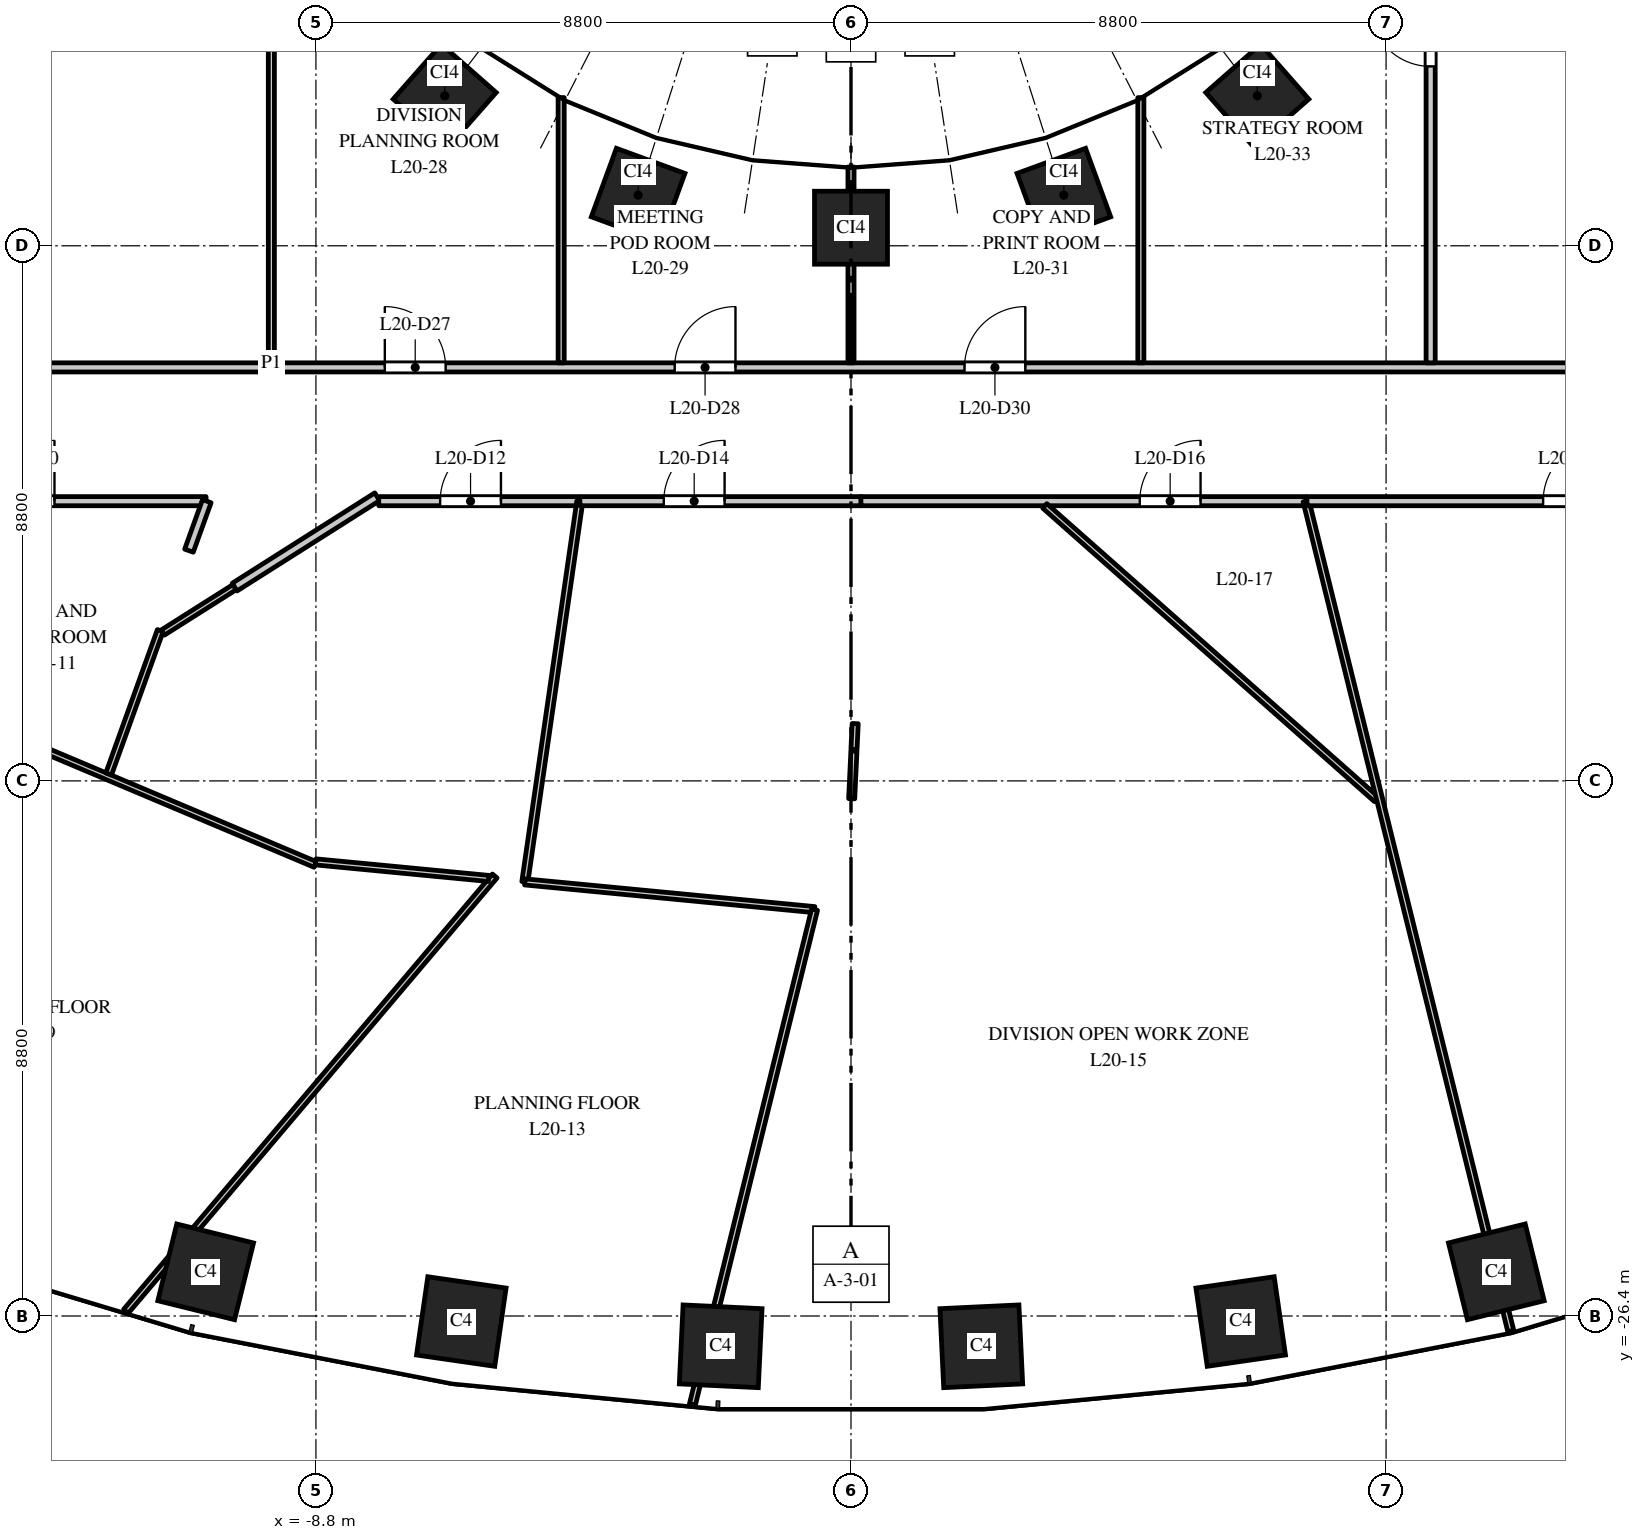
"""IFC4 building model, lengths in metres.
Left out: names, types, materials, properties, quantities, classifications, styles, units other than length and angle.
Written with IfcOpenShell. Run it as: python <this file> out.ifc"""

import sys

from ifc_helpers import new_model, si_unit, direction, frame, frame_2d, origin, origin_2d, place, context, subcontext, project, spatial, rectangle, extrude, element, fill, save


model = new_model("IFC4")
c1 = context("Model", 3, precision=1e-05, world=origin(), true_north=direction((0.0, 1.0)))
c2 = subcontext(c1, "Body", "Model", "MODEL_VIEW")
j1 = project(units=[si_unit("LENGTHUNIT", "METRE"), si_unit("PLANEANGLEUNIT", "RADIAN")], contexts=[c1])
p1 = place(None, origin())
s1 = spatial("IfcSite", under=j1, at=p1, CompositionType="ELEMENT")
p2 = place(p1, origin())
s2 = spatial("IfcBuilding", under=s1, at=p2, CompositionType="ELEMENT")
p3 = place(p2, frame((0.0, 0.0, 92.0)))
s3 = spatial("IfcBuildingStorey", under=s2, at=p3, CompositionType="ELEMENT", Elevation=92.0)
for number, where, z_axis, x_axis in (
    (1, (-10.613, -25.674, 0.0), (0.0, 0.0, 1.0), (0.971, -0.24, 0.0)),
    (2, (-6.409, -26.491, 0.0), (0.0, 0.0, 1.0), (0.99, -0.143, 0.0)),
    (3, (-2.143, -26.898, 0.0), (0.0, 0.0, 1.0), (0.999, -0.048, 0.0)),
    (4, (2.143, -26.898, 0.0), (0.0, 0.0, 1.0), (0.999, 0.048, 0.0)),
    (5, (6.409, -26.491, 0.0), (0.0, 0.0, 1.0), (0.99, 0.143, 0.0)),
    (6, (10.613, -25.674, 0.0), (0.0, 0.0, 1.0), (0.971, 0.24, 0.0)),
):
    element("IfcColumn", number, at=place(p3, frame(where, z_axis=z_axis, x_axis=x_axis)), inside=s3, PredefinedType="COLUMN", context=c2, shape_type="SweptSolid", body=[
        extrude(rectangle(XDim=1.3, YDim=1.3, at=origin_2d()), origin(), (0.0, 0.0, 1.0), 4.0),
    ])
for number, where, z_axis, x_axis in (
    (7, (-6.682, -6.334, 0.0), (0.0, 0.0, 1.0), (0.751, -0.66, 0.0)),
    (8, (-3.501, -7.967, 0.0), (0.0, 0.0, 1.0), (0.939, -0.344, 0.0)),
    (9, (0.0, -8.503, 0.0), (0.0, 0.0, 1.0), (1.0, 0.0, 0.0)),
    (10, (3.501, -7.967, 0.0), (0.0, 0.0, 1.0), (0.939, 0.344, 0.0)),
    (11, (6.682, -6.334, 0.0), (0.0, 0.0, 1.0), (0.751, 0.66, 0.0)),
):
    element("IfcColumn", number, at=place(p3, frame(where, z_axis=z_axis, x_axis=x_axis)), inside=s3, PredefinedType="COLUMN", context=c2, shape_type="SweptSolid", body=[
        extrude(rectangle(XDim=1.2, YDim=1.2, at=origin_2d()), origin(), (0.0, 0.0, 1.0), 4.0),
    ])
p4 = place(p3, frame((-18.586, -14.849, 0.0), z_axis=(0.0, 0.0, 1.0), x_axis=(0.921309292198, -0.388830539066, 0.0)))
e12 = element("IfcWall", 12, at=p4, inside=s3, PredefinedType="PARTITIONING", context=c2, shape_type="SweptSolid", body=[
    extrude(rectangle(XDim=10.609, YDim=0.1, at=frame_2d((5.304, 0.0))), origin(), (0.0, 0.0, 1.0), 2.85),
])
p5 = place(p3, frame((-16.5, -13.0, 0.0), z_axis=(0.0, 0.0, 1.0), x_axis=(1.0, 0.0, 0.0)))
e13 = element("IfcWall", 13, at=p5, inside=s3, PredefinedType="PARTITIONING", context=c2, shape_type="SweptSolid", body=[
    extrude(rectangle(XDim=5.893, YDim=0.15, at=frame_2d((2.947, 0.0))), origin(), (0.0, 0.0, 1.0), 2.85),
])
p6 = place(p5, frame((2.4, 0.0, 0.0)))
e14 = element("IfcOpeningElement", 14, at=p6, cuts=e13, PredefinedType="OPENING", context=c2, shape_type="SweptSolid", body=[
    extrude(rectangle(XDim=1.0, YDim=2.1, at=frame_2d((0.5, 1.05))), frame((0.0, 0.085, 0.0), z_axis=(0.0, -1.0, 0.0), x_axis=(1.0, 0.0, 0.0)), (0.0, 0.0, 1.0), 0.17),
])
p7 = place(p3, frame((-14.3, -10.8, 0.0), z_axis=(0.0, 0.0, 1.0), x_axis=(1.0, 0.0, 0.0)))
e15 = element("IfcWall", 15, at=p7, inside=s3, PredefinedType="PARTITIONING", context=c2, shape_type="SweptSolid", body=[
    extrude(rectangle(XDim=28.6, YDim=0.15, at=frame_2d((14.3, 0.0))), origin(), (0.0, 0.0, 1.0), 2.85),
])
p8 = place(p7, frame((6.633, 0.0, 0.0)))
e16 = element("IfcOpeningElement", 16, at=p8, cuts=e15, PredefinedType="OPENING", context=c2, shape_type="SweptSolid", body=[
    extrude(rectangle(XDim=1.0, YDim=2.1, at=frame_2d((0.5, 1.05))), frame((0.0, 0.085, 0.0), z_axis=(0.0, -1.0, 0.0), x_axis=(1.0, 0.0, 0.0)), (0.0, 0.0, 1.0), 0.17),
])
p9 = place(p7, frame((11.4, 0.0, 0.0)))
e17 = element("IfcOpeningElement", 17, at=p9, cuts=e15, PredefinedType="OPENING", context=c2, shape_type="SweptSolid", body=[
    extrude(rectangle(XDim=1.0, YDim=2.1, at=frame_2d((0.5, 1.05))), frame((0.0, 0.085, 0.0), z_axis=(0.0, -1.0, 0.0), x_axis=(1.0, 0.0, 0.0)), (0.0, 0.0, 1.0), 0.17),
])
p10 = place(p7, frame((16.167, 0.0, 0.0)))
e18 = element("IfcOpeningElement", 18, at=p10, cuts=e15, PredefinedType="OPENING", context=c2, shape_type="SweptSolid", body=[
    extrude(rectangle(XDim=1.0, YDim=2.1, at=frame_2d((0.5, 1.05))), frame((0.0, 0.085, 0.0), z_axis=(0.0, -1.0, 0.0), x_axis=(1.0, 0.0, 0.0)), (0.0, 0.0, 1.0), 0.17),
])
p11 = place(p3, frame((-12.209, -17.486, 0.0), z_axis=(0.0, 0.0, 1.0), x_axis=(0.338698771758, 0.940894862357, 0.0)))
e19 = element("IfcWall", 19, at=p11, inside=s3, PredefinedType="PARTITIONING", context=c2, shape_type="SweptSolid", body=[
    extrude(rectangle(XDim=2.506, YDim=0.1, at=frame_2d((1.253, 0.0))), origin(), (0.0, 0.0, 1.0), 3.7),
])
p12 = place(p3, frame((-11.925, -26.323, 0.0), z_axis=(0.0, 0.0, 1.0), x_axis=(0.646476265577, 0.762934098101, 0.0)))
e20 = element("IfcWall", 20, at=p12, inside=s3, PredefinedType="PARTITIONING", context=c2, shape_type="SweptSolid", body=[
    extrude(rectangle(XDim=9.384, YDim=0.1, at=frame_2d((4.692, 0.0))), origin(), (0.0, 0.0, 1.0), 2.85),
])
p13 = place(p3, frame((-11.319, -15.161, 0.0), z_axis=(0.0, 0.0, 1.0), x_axis=(0.845102975348, 0.534603555037, 0.0)))
e21 = element("IfcWall", 21, at=p13, inside=s3, PredefinedType="PARTITIONING", context=c2, shape_type="SweptSolid", body=[
    extrude(rectangle(XDim=1.399, YDim=0.1, at=frame_2d((0.699, 0.0))), origin(), (0.0, 0.0, 1.0), 3.7),
])
p14 = place(p3, frame((-10.888, -13.814, 0.0), z_axis=(0.0, 0.0, 1.0), x_axis=(0.338659506624, 0.940908995904, 0.0)))
e22 = element("IfcWall", 22, at=p14, inside=s3, PredefinedType="PARTITIONING", context=c2, shape_type="SweptSolid", body=[
    extrude(rectangle(XDim=0.865, YDim=0.15, at=frame_2d((0.433, 0.0))), origin(), (0.0, 0.0, 1.0), 2.85),
])
p15 = place(p3, frame((-10.137, -14.413, 0.0), z_axis=(0.0, 0.0, 1.0), x_axis=(0.844666662568, 0.535292657475, 0.0)))
e23 = element("IfcWall", 23, at=p15, inside=s3, PredefinedType="PARTITIONING", context=c2, shape_type="SweptSolid", body=[
    extrude(rectangle(XDim=2.776, YDim=0.15, at=frame_2d((1.388, 0.0))), origin(), (0.0, 0.0, 1.0), 3.7),
])
p16 = place(p3, frame((-9.533, -10.725, 0.0), z_axis=(0.0, 0.0, 1.0), x_axis=(0.0, 1.0, 0.0)))
e24 = element("IfcWall", 24, at=p16, inside=s3, PredefinedType="PARTITIONING", context=c2, shape_type="SweptSolid", body=[
    extrude(rectangle(XDim=21.45, YDim=0.1, at=frame_2d((10.725, 0.0))), origin(), (0.0, 0.0, 1.0), 2.75),
])
p17 = place(p3, frame((-8.802, -18.932, 0.0), z_axis=(0.0, 0.0, 1.0), x_axis=(0.995447320833, -0.095313332995, 0.0)))
e25 = element("IfcWall", 25, at=p17, inside=s3, PredefinedType="PARTITIONING", context=c2, shape_type="SweptSolid", body=[
    extrude(rectangle(XDim=2.856, YDim=0.1, at=frame_2d((1.428, 0.0))), origin(), (0.0, 0.0, 1.0), 2.85),
])
p18 = place(p3, frame((-7.767, -13.0, 0.0), z_axis=(0.0, 0.0, 1.0), x_axis=(1.0, 0.0, 0.0)))
e26 = element("IfcWall", 26, at=p18, inside=s3, PredefinedType="PARTITIONING", context=c2, shape_type="SweptSolid", body=[
    extrude(rectangle(XDim=3.288, YDim=0.15, at=frame_2d((1.644, 0.0))), origin(), (0.0, 0.0, 1.0), 2.85),
])
p19 = place(p18, frame((1.01, 0.0, 0.0)))
e27 = element("IfcOpeningElement", 27, at=p19, cuts=e26, PredefinedType="OPENING", context=c2, shape_type="SweptSolid", body=[
    extrude(rectangle(XDim=1.0, YDim=2.1, at=frame_2d((0.5, 1.05))), frame((0.0, 0.085, 0.0), z_axis=(0.0, -1.0, 0.0), x_axis=(1.0, 0.0, 0.0)), (0.0, 0.0, 1.0), 0.17),
])
p20 = place(p3, frame((-5.364, -19.261, 0.0), z_axis=(0.0, 0.0, 1.0), x_axis=(0.142999851524, 0.989722709886, 0.0)))
e28 = element("IfcWall", 28, at=p20, inside=s3, PredefinedType="PARTITIONING", context=c2, shape_type="SweptSolid", body=[
    extrude(rectangle(XDim=6.322, YDim=0.1, at=frame_2d((3.161, 0.0))), origin(), (0.0, 0.0, 1.0), 3.7),
])
p21 = place(p3, frame((-5.364, -19.261, 0.0), z_axis=(0.0, 0.0, 1.0), x_axis=(0.995450891917, -0.095276029415, 0.0)))
e29 = element("IfcWall", 29, at=p21, inside=s3, PredefinedType="PARTITIONING", context=c2, shape_type="SweptSolid", body=[
    extrude(rectangle(XDim=4.787, YDim=0.1, at=frame_2d((2.393, 0.0))), origin(), (0.0, 0.0, 1.0), 2.85),
])
p22 = place(p3, frame((-4.767, -10.725, 0.0), z_axis=(0.0, 0.0, 1.0), x_axis=(0.0, 1.0, 0.0)))
e30 = element("IfcWall", 30, at=p22, inside=s3, PredefinedType="PARTITIONING", context=c2, shape_type="SweptSolid", body=[
    extrude(rectangle(XDim=4.362, YDim=0.1, at=frame_2d((2.181, 0.0))), origin(), (0.0, 0.0, 1.0), 2.9),
])
p23 = place(p3, frame((-4.459, -13.0, 0.0), z_axis=(0.0, 0.0, 1.0), x_axis=(1.0, 0.0, 0.0)))
e31 = element("IfcWall", 31, at=p23, inside=s3, PredefinedType="PARTITIONING", context=c2, shape_type="SweptSolid", body=[
    extrude(rectangle(XDim=4.628, YDim=0.15, at=frame_2d((2.314, 0.0))), origin(), (0.0, 0.0, 1.0), 2.85),
])
p24 = place(p23, frame((1.38, 0.0, 0.0)))
e32 = element("IfcOpeningElement", 32, at=p24, cuts=e31, PredefinedType="OPENING", context=c2, shape_type="SweptSolid", body=[
    extrude(rectangle(XDim=1.0, YDim=2.1, at=frame_2d((0.5, 1.05))), frame((0.0, 0.085, 0.0), z_axis=(0.0, -1.0, 0.0), x_axis=(1.0, 0.0, 0.0)), (0.0, 0.0, 1.0), 0.17),
])
p25 = place(p3, frame((-2.609, -27.858, 0.0), z_axis=(0.0, 0.0, 1.0), x_axis=(0.239677840558, 0.970852477334, 0.0)))
e33 = element("IfcWall", 33, at=p25, inside=s3, PredefinedType="PARTITIONING", context=c2, shape_type="SweptSolid", body=[
    extrude(rectangle(XDim=8.385, YDim=0.1, at=frame_2d((4.193, 0.0))), origin(), (0.0, 0.0, 1.0), 2.85),
])
p26 = place(p3, frame((0.0, -10.725, 0.0), z_axis=(0.0, 0.0, 1.0), x_axis=(0.0, 1.0, 0.0)))
e34 = element("IfcWall", 34, at=p26, inside=s3, PredefinedType="PARTITIONING", context=c2, shape_type="SweptSolid", body=[
    extrude(rectangle(XDim=3.221, YDim=0.1, at=frame_2d((1.611, 0.0))), origin(), (0.0, 0.0, 1.0), 3.7),
])
p27 = place(p3, frame((0.011, -17.893, 0.0), z_axis=(0.0, 0.0, 1.0), x_axis=(0.047210979752, 0.998884940016, 0.0)))
e35 = element("IfcWall", 35, at=p27, inside=s3, PredefinedType="PARTITIONING", context=c2, shape_type="SweptSolid", body=[
    extrude(rectangle(XDim=0.786, YDim=0.1, at=frame_2d((0.393, 0.0))), origin(), (0.0, 0.0, 1.0), 3.7),
])
p28 = place(p3, frame((0.049, -17.081, 0.0), z_axis=(0.0, 0.0, 1.0), x_axis=(0.047263912187, 0.998882436829, 0.0)))
e36 = element("IfcWall", 36, at=p28, inside=s3, PredefinedType="PARTITIONING", context=c2, shape_type="SweptSolid", body=[
    extrude(rectangle(XDim=0.424, YDim=0.1, at=frame_2d((0.212, 0.0))), origin(), (0.0, 0.0, 1.0), 3.7),
])
p29 = place(p3, frame((0.163, -13.0, 0.0), z_axis=(0.0, 0.0, 1.0), x_axis=(1.0, 0.0, 0.0)))
e37 = element("IfcWall", 37, at=p29, inside=s3, PredefinedType="PARTITIONING", context=c2, shape_type="SweptSolid", body=[
    extrude(rectangle(XDim=7.32, YDim=0.15, at=frame_2d((3.66, 0.0))), origin(), (0.0, 0.0, 1.0), 2.85),
])
p30 = place(p29, frame((4.586, 0.0, 0.0)))
e38 = element("IfcOpeningElement", 38, at=p30, cuts=e37, PredefinedType="OPENING", context=c2, shape_type="SweptSolid", body=[
    extrude(rectangle(XDim=1.0, YDim=2.1, at=frame_2d((0.5, 1.05))), frame((0.0, 0.085, 0.0), z_axis=(0.0, -1.0, 0.0), x_axis=(1.0, 0.0, 0.0)), (0.0, 0.0, 1.0), 0.17),
])
p31 = place(p3, frame((3.187, -13.078, 0.0), z_axis=(0.0, 0.0, 1.0), x_axis=(0.749027274438, -0.662539162728, 0.0)))
e39 = element("IfcWall", 39, at=p31, inside=s3, PredefinedType="PARTITIONING", context=c2, shape_type="SweptSolid", body=[
    extrude(rectangle(XDim=7.283, YDim=0.1, at=frame_2d((3.642, 0.0))), origin(), (0.0, 0.0, 1.0), 2.85),
])
p32 = place(p3, frame((4.767, -10.725, 0.0), z_axis=(0.0, 0.0, 1.0), x_axis=(0.0, 1.0, 0.0)))
e40 = element("IfcWall", 40, at=p32, inside=s3, PredefinedType="PARTITIONING", context=c2, shape_type="SweptSolid", body=[
    extrude(rectangle(XDim=4.362, YDim=0.1, at=frame_2d((2.181, 0.0))), origin(), (0.0, 0.0, 1.0), 2.85),
])
p33 = place(p3, frame((7.484, -13.0, 0.0), z_axis=(0.0, 0.0, 1.0), x_axis=(0.239551123524, -0.97088375165, 0.0)))
e41 = element("IfcWall", 41, at=p33, inside=s3, PredefinedType="PARTITIONING", context=c2, shape_type="SweptSolid", body=[
    extrude(rectangle(XDim=14.056, YDim=0.1, at=frame_2d((7.028, 0.0))), origin(), (0.0, 0.0, 1.0), 2.9),
])
p34 = place(p3, frame((7.499, -13.0, 0.0), z_axis=(0.0, 0.0, 1.0), x_axis=(1.0, 0.0, 0.0)))
e42 = element("IfcWall", 42, at=p34, inside=s3, PredefinedType="PARTITIONING", context=c2, shape_type="SweptSolid", body=[
    extrude(rectangle(XDim=9.001, YDim=0.15, at=frame_2d((4.5, 0.0))), origin(), (0.0, 0.0, 1.0), 2.85),
])
p35 = place(p34, frame((3.884, 0.0, 0.0)))
e43 = element("IfcOpeningElement", 43, at=p35, cuts=e42, PredefinedType="OPENING", context=c2, shape_type="SweptSolid", body=[
    extrude(rectangle(XDim=1.0, YDim=2.1, at=frame_2d((0.5, 1.05))), frame((0.0, 0.085, 0.0), z_axis=(0.0, -1.0, 0.0), x_axis=(1.0, 0.0, 0.0)), (0.0, 0.0, 1.0), 0.17),
])
p36 = place(p3, frame((9.533, -10.725, 0.0), z_axis=(0.0, 0.0, 1.0), x_axis=(0.0, 1.0, 0.0)))
e44 = element("IfcWall", 44, at=p36, inside=s3, PredefinedType="PARTITIONING", context=c2, shape_type="SweptSolid", body=[
    extrude(rectangle(XDim=21.45, YDim=0.15, at=frame_2d((10.725, 0.0))), origin(), (0.0, 0.0, 1.0), 2.75),
])
p37 = place(p36, frame((4.875, 0.0, 0.0)))
e45 = element("IfcOpeningElement", 45, at=p37, cuts=e44, PredefinedType="OPENING", context=c2, shape_type="SweptSolid", body=[
    extrude(rectangle(XDim=1.0, YDim=2.1, at=frame_2d((0.5, 1.05))), frame((0.0, 0.085, 0.0), z_axis=(0.0, -1.0, 0.0), x_axis=(1.0, 0.0, 0.0)), (0.0, 0.0, 1.0), 0.17),
])
p38 = place(p6, origin())
e46 = element("IfcDoor", 46, at=p38, inside=s3, OperationType="SINGLE_SWING_RIGHT", PredefinedType="DOOR", context=c2, shape_type="SweptSolid", body=[
    extrude(rectangle(XDim=1.0, YDim=2.1, at=frame_2d((0.5, 1.05))), frame((0.0, 0.025, 0.0), z_axis=(0.0, -1.0, 0.0), x_axis=(1.0, 0.0, 0.0)), (0.0, 0.0, 1.0), 0.05),
])
fill(e14, e46)
p39 = place(p19, origin())
e47 = element("IfcDoor", 47, at=p39, inside=s3, OperationType="SINGLE_SWING_RIGHT", PredefinedType="DOOR", context=c2, shape_type="SweptSolid", body=[
    extrude(rectangle(XDim=1.0, YDim=2.1, at=frame_2d((0.5, 1.05))), frame((0.0, 0.025, 0.0), z_axis=(0.0, -1.0, 0.0), x_axis=(1.0, 0.0, 0.0)), (0.0, 0.0, 1.0), 0.05),
])
fill(e27, e47)
p40 = place(p24, origin())
e48 = element("IfcDoor", 48, at=p40, inside=s3, OperationType="SINGLE_SWING_RIGHT", PredefinedType="DOOR", context=c2, shape_type="SweptSolid", body=[
    extrude(rectangle(XDim=1.0, YDim=2.1, at=frame_2d((0.5, 1.05))), frame((0.0, 0.025, 0.0), z_axis=(0.0, -1.0, 0.0), x_axis=(1.0, 0.0, 0.0)), (0.0, 0.0, 1.0), 0.05),
])
fill(e32, e48)
p41 = place(p30, origin())
e49 = element("IfcDoor", 49, at=p41, inside=s3, OperationType="SINGLE_SWING_RIGHT", PredefinedType="DOOR", context=c2, shape_type="SweptSolid", body=[
    extrude(rectangle(XDim=1.0, YDim=2.1, at=frame_2d((0.5, 1.05))), frame((0.0, 0.025, 0.0), z_axis=(0.0, -1.0, 0.0), x_axis=(1.0, 0.0, 0.0)), (0.0, 0.0, 1.0), 0.05),
])
fill(e38, e49)
p42 = place(p35, origin())
e50 = element("IfcDoor", 50, at=p42, inside=s3, OperationType="SINGLE_SWING_RIGHT", PredefinedType="DOOR", context=c2, shape_type="SweptSolid", body=[
    extrude(rectangle(XDim=1.0, YDim=2.1, at=frame_2d((0.5, 1.05))), frame((0.0, 0.025, 0.0), z_axis=(0.0, -1.0, 0.0), x_axis=(1.0, 0.0, 0.0)), (0.0, 0.0, 1.0), 0.05),
])
fill(e43, e50)
p43 = place(p8, origin())
e51 = element("IfcDoor", 51, at=p43, inside=s3, OperationType="SINGLE_SWING_LEFT", PredefinedType="DOOR", context=c2, shape_type="SweptSolid", body=[
    extrude(rectangle(XDim=1.0, YDim=2.1, at=frame_2d((0.5, 1.05))), frame((0.0, 0.025, 0.0), z_axis=(0.0, -1.0, 0.0), x_axis=(1.0, 0.0, 0.0)), (0.0, 0.0, 1.0), 0.05),
])
fill(e16, e51)
p44 = place(p9, origin())
e52 = element("IfcDoor", 52, at=p44, inside=s3, OperationType="SINGLE_SWING_RIGHT", PredefinedType="DOOR", context=c2, shape_type="SweptSolid", body=[
    extrude(rectangle(XDim=1.0, YDim=2.1, at=frame_2d((0.5, 1.05))), frame((0.0, 0.025, 0.0), z_axis=(0.0, -1.0, 0.0), x_axis=(1.0, 0.0, 0.0)), (0.0, 0.0, 1.0), 0.05),
])
fill(e17, e52)
p45 = place(p10, origin())
e53 = element("IfcDoor", 53, at=p45, inside=s3, OperationType="SINGLE_SWING_RIGHT", PredefinedType="DOOR", context=c2, shape_type="SweptSolid", body=[
    extrude(rectangle(XDim=1.0, YDim=2.1, at=frame_2d((0.5, 1.05))), frame((0.0, 0.025, 0.0), z_axis=(0.0, -1.0, 0.0), x_axis=(1.0, 0.0, 0.0)), (0.0, 0.0, 1.0), 0.05),
])
fill(e18, e53)
p46 = place(p37, origin())
e54 = element("IfcDoor", 54, at=p46, inside=s3, OperationType="SINGLE_SWING_RIGHT", PredefinedType="DOOR", context=c2, shape_type="SweptSolid", body=[
    extrude(rectangle(XDim=1.0, YDim=2.1, at=frame_2d((0.5, 1.05))), frame((0.0, 0.025, 0.0), z_axis=(0.0, -1.0, 0.0), x_axis=(1.0, 0.0, 0.0)), (0.0, 0.0, 1.0), 0.05),
])
fill(e45, e54)
save(model, sys.argv[1])
